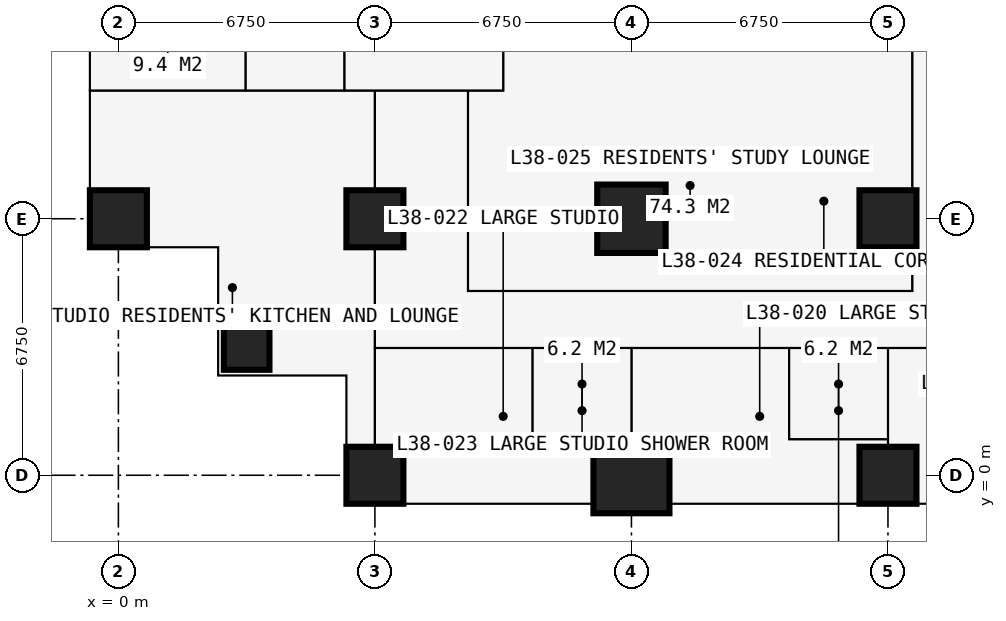
"""IFC4 building model, lengths in metres.
Left out: names, types, materials, properties, quantities, classifications, styles, units other than length and angle.
Written with IfcOpenShell. Run it as: python <this file> out.ifc"""

import sys

from ifc_helpers import new_model, si_unit, direction, frame, frame_2d, origin, origin_2d, place, context, subcontext, project, spatial, rectangle, extrude, element, fill, save


model = new_model("IFC4")
c1 = context("Model", 3, precision=1e-05, world=origin(), true_north=direction((0.0, 1.0)))
c2 = subcontext(c1, "Body", "Model", "MODEL_VIEW")
j1 = project(units=[si_unit("LENGTHUNIT", "METRE"), si_unit("PLANEANGLEUNIT", "RADIAN")], contexts=[c1])
p1 = place(None, origin())
s1 = spatial("IfcSite", under=j1, at=p1, CompositionType="ELEMENT")
p2 = place(p1, origin())
s2 = spatial("IfcBuilding", under=s1, at=p2, CompositionType="ELEMENT")
p3 = place(p2, frame((0.0, 0.0, 142.2)))
s3 = spatial("IfcBuildingStorey", under=s2, at=p3, CompositionType="ELEMENT", Elevation=142.2)
p4 = place(p3, frame((0.0, 6.75, 0.0), z_axis=(0.0, 0.0, 1.0), x_axis=(1.0, 0.0, 0.0)))
e1 = element("IfcColumn", 1, at=p4, inside=s3, PredefinedType="COLUMN", context=c2, shape_type="SweptSolid", body=[
    extrude(rectangle(XDim=1.5, YDim=1.5, at=origin_2d()), origin(), (0.0, 0.0, 1.0), 3.6),
])
p5 = place(p3, frame((3.375, 3.375, 0.0), z_axis=(0.0, 0.0, 1.0), x_axis=(1.0, 0.0, 0.0)))
e2 = element("IfcColumn", 2, at=p5, inside=s3, PredefinedType="COLUMN", context=c2, shape_type="SweptSolid", body=[
    extrude(rectangle(XDim=1.2, YDim=1.2, at=origin_2d()), origin(), (0.0, 0.0, 1.0), 3.6),
])
for number, where, z_axis, x_axis in (
    (3, (6.75, 0.0, 0.0), (0.0, 0.0, 1.0), (1.0, 0.0, 0.0)),
    (4, (6.75, 6.75, 0.0), (0.0, 0.0, 1.0), (1.0, 0.0, 0.0)),
):
    element("IfcColumn", number, at=place(p3, frame(where, z_axis=z_axis, x_axis=x_axis)), inside=s3, PredefinedType="COLUMN", context=c2, shape_type="SweptSolid", body=[
        extrude(rectangle(XDim=1.5, YDim=1.5, at=origin_2d()), origin(), (0.0, 0.0, 1.0), 3.6),
    ])
p6 = place(p3, frame((13.5, 0.0, 0.0), z_axis=(0.0, 0.0, 1.0), x_axis=(1.0, 0.0, 0.0)))
e5 = element("IfcColumn", 5, at=p6, inside=s3, PredefinedType="COLUMN", context=c2, shape_type="SweptSolid", body=[
    extrude(rectangle(XDim=2.0, YDim=2.0, at=origin_2d()), origin(), (0.0, 0.0, 1.0), 3.6),
])
p7 = place(p3, frame((13.5, 6.75, 0.0), z_axis=(0.0, 0.0, 1.0), x_axis=(1.0, 0.0, 0.0)))
e6 = element("IfcColumn", 6, at=p7, inside=s3, PredefinedType="COLUMN", context=c2, shape_type="SweptSolid", body=[
    extrude(rectangle(XDim=1.8, YDim=1.8, at=origin_2d()), origin(), (0.0, 0.0, 1.0), 3.6),
])
for number, where, z_axis, x_axis in (
    (7, (20.25, 0.0, 0.0), (0.0, 0.0, 1.0), (1.0, 0.0, 0.0)),
    (8, (20.25, 6.75, 0.0), (0.0, 0.0, 1.0), (1.0, 0.0, 0.0)),
):
    element("IfcColumn", number, at=place(p3, frame(where, z_axis=z_axis, x_axis=x_axis)), inside=s3, PredefinedType="COLUMN", context=c2, shape_type="SweptSolid", body=[
        extrude(rectangle(XDim=1.5, YDim=1.5, at=origin_2d()), origin(), (0.0, 0.0, 1.0), 3.6),
    ])
p8 = place(p3, frame((-0.75, 6.0, 0.0), z_axis=(0.0, 0.0, 1.0), x_axis=(1.0, 0.0, 0.0)))
e9 = element("IfcWall", 9, at=p8, inside=s3, PredefinedType="SOLIDWALL", context=c2, shape_type="SweptSolid", body=[
    extrude(rectangle(XDim=3.375, YDim=0.3, at=frame_2d((1.688, 0.0))), origin(), (0.0, 0.0, 1.0), 3.375),
])
p9 = place(p8, frame((1.607, 0.0, 0.9)))
e10 = element("IfcOpeningElement", 10, at=p9, cuts=e9, PredefinedType="OPENING", context=c2, shape_type="SweptSolid", body=[
    extrude(rectangle(XDim=1.5, YDim=1.8, at=frame_2d((0.75, 0.9))), frame((0.0, 0.16, 0.0), z_axis=(0.0, -1.0, 0.0), x_axis=(1.0, 0.0, 0.0)), (0.0, 0.0, 1.0), 0.32),
])
p10 = place(p3, frame((2.625, 6.0, 0.0), z_axis=(0.0, 0.0, 1.0), x_axis=(0.0, -1.0, 0.0)))
e11 = element("IfcWall", 11, at=p10, inside=s3, PredefinedType="SOLIDWALL", context=c2, shape_type="SweptSolid", body=[
    extrude(rectangle(XDim=3.375, YDim=0.3, at=frame_2d((1.688, 0.0))), origin(), (0.0, 0.0, 1.0), 3.375),
])
p11 = place(p10, frame((0.788, 0.0, 0.6)))
e12 = element("IfcOpeningElement", 12, at=p11, cuts=e11, PredefinedType="OPENING", context=c2, shape_type="SweptSolid", body=[
    extrude(rectangle(XDim=1.8, YDim=2.1, at=frame_2d((0.9, 1.05))), frame((0.0, 0.16, 0.0), z_axis=(0.0, -1.0, 0.0), x_axis=(1.0, 0.0, 0.0)), (0.0, 0.0, 1.0), 0.32),
])
p12 = place(p3, frame((2.625, 2.625, 0.0), z_axis=(0.0, 0.0, 1.0), x_axis=(1.0, 0.0, 0.0)))
e13 = element("IfcWall", 13, at=p12, inside=s3, PredefinedType="SOLIDWALL", context=c2, shape_type="SweptSolid", body=[
    extrude(rectangle(XDim=3.375, YDim=0.3, at=frame_2d((1.688, 0.0))), origin(), (0.0, 0.0, 1.0), 3.375),
])
p13 = place(p12, frame((0.788, 0.0, 0.6)))
e14 = element("IfcOpeningElement", 14, at=p13, cuts=e13, PredefinedType="OPENING", context=c2, shape_type="SweptSolid", body=[
    extrude(rectangle(XDim=1.8, YDim=2.1, at=frame_2d((0.9, 1.05))), frame((0.0, 0.16, 0.0), z_axis=(0.0, -1.0, 0.0), x_axis=(1.0, 0.0, 0.0)), (0.0, 0.0, 1.0), 0.32),
])
p14 = place(p3, frame((6.0, 2.625, 0.0), z_axis=(0.0, 0.0, 1.0), x_axis=(0.0, -1.0, 0.0)))
e15 = element("IfcWall", 15, at=p14, inside=s3, PredefinedType="SOLIDWALL", context=c2, shape_type="SweptSolid", body=[
    extrude(rectangle(XDim=3.375, YDim=0.3, at=frame_2d((1.688, 0.0))), origin(), (0.0, 0.0, 1.0), 3.375),
])
p15 = place(p14, frame((0.268, 0.0, 0.9)))
e16 = element("IfcOpeningElement", 16, at=p15, cuts=e15, PredefinedType="OPENING", context=c2, shape_type="SweptSolid", body=[
    extrude(rectangle(XDim=1.5, YDim=1.8, at=frame_2d((0.75, 0.9))), frame((0.0, 0.16, 0.0), z_axis=(0.0, -1.0, 0.0), x_axis=(1.0, 0.0, 0.0)), (0.0, 0.0, 1.0), 0.32),
])
p16 = place(p3, frame((20.25, -0.75, 0.0), z_axis=(0.0, 0.0, 1.0), x_axis=(-1.0, 0.0, 0.0)))
e17 = element("IfcWall", 17, at=p16, inside=s3, PredefinedType="SOLIDWALL", context=c2, shape_type="SweptSolid", body=[
    extrude(rectangle(XDim=6.75, YDim=0.15, at=frame_2d((3.375, 0.0))), origin(), (0.0, 0.0, 1.0), 3.375),
])
p17 = place(p16, frame((0.863, 0.0, 0.0)))
e18 = element("IfcOpeningElement", 18, at=p17, cuts=e17, PredefinedType="OPENING", context=c2, shape_type="SweptSolid", body=[
    extrude(rectangle(XDim=1.0, YDim=2.2, at=frame_2d((0.5, 1.1))), frame((0.0, 0.085, 0.0), z_axis=(0.0, -1.0, 0.0), x_axis=(1.0, 0.0, 0.0)), (0.0, 0.0, 1.0), 0.17),
])
p18 = place(p16, frame((1.975, 0.0, 0.9)))
e19 = element("IfcOpeningElement", 19, at=p18, cuts=e17, PredefinedType="OPENING", context=c2, shape_type="SweptSolid", body=[
    extrude(rectangle(XDim=1.2, YDim=1.8, at=frame_2d((0.6, 0.9))), frame((0.0, 0.085, 0.0), z_axis=(0.0, -1.0, 0.0), x_axis=(1.0, 0.0, 0.0)), (0.0, 0.0, 1.0), 0.17),
])
p19 = place(p16, frame((4.621, 0.0, 0.0)))
e20 = element("IfcOpeningElement", 20, at=p19, cuts=e17, PredefinedType="OPENING", context=c2, shape_type="SweptSolid", body=[
    extrude(rectangle(XDim=1.0, YDim=2.2, at=frame_2d((0.5, 1.1))), frame((0.0, 0.085, 0.0), z_axis=(0.0, -1.0, 0.0), x_axis=(1.0, 0.0, 0.0)), (0.0, 0.0, 1.0), 0.17),
])
p20 = place(p16, frame((3.592, 0.0, 0.9)))
e21 = element("IfcOpeningElement", 21, at=p20, cuts=e17, PredefinedType="OPENING", context=c2, shape_type="SweptSolid", body=[
    extrude(rectangle(XDim=0.9, YDim=1.8, at=frame_2d((0.45, 0.9))), frame((0.0, 0.085, 0.0), z_axis=(0.0, -1.0, 0.0), x_axis=(1.0, 0.0, 0.0)), (0.0, 0.0, 1.0), 0.17),
])
p21 = place(p3, frame((16.875, -0.85, 0.0), z_axis=(0.0, 0.0, 1.0), x_axis=(0.0, -1.0, 0.0)))
e22 = element("IfcWall", 22, at=p21, inside=s3, PredefinedType="USERDEFINED", context=c2, shape_type="SweptSolid", body=[
    extrude(rectangle(XDim=2.2, YDim=1.0, at=frame_2d((1.1, 0.0))), origin(), (0.0, 0.0, 1.0), 0.9),
])
p22 = place(p3, frame((-0.734, 10.125, 0.0), z_axis=(0.0, 0.0, 1.0), x_axis=(1.0, 0.0, 0.0)))
e23 = element("IfcWall", 23, at=p22, inside=s3, PredefinedType="PARTITIONING", context=c2, shape_type="SweptSolid", body=[
    extrude(rectangle(XDim=10.859, YDim=0.15, at=frame_2d((5.429, 0.0))), origin(), (0.0, 0.0, 1.0), 3.375),
])
p23 = place(p22, frame((8.234, 0.0, 0.0)))
e24 = element("IfcOpeningElement", 24, at=p23, cuts=e23, PredefinedType="OPENING", context=c2, shape_type="SweptSolid", body=[
    extrude(rectangle(XDim=0.95, YDim=2.2, at=frame_2d((0.475, 1.1))), frame((0.0, 0.085, 0.0), z_axis=(0.0, -1.0, 0.0), x_axis=(1.0, 0.0, 0.0)), (0.0, 0.0, 1.0), 0.17),
])
p24 = place(p3, frame((3.35, 10.125, 0.0), z_axis=(0.0, 0.0, 1.0), x_axis=(0.0, 1.0, 0.0)))
e25 = element("IfcWall", 25, at=p24, inside=s3, PredefinedType="PARTITIONING", context=c2, shape_type="SweptSolid", body=[
    extrude(rectangle(XDim=16.875, YDim=0.15, at=frame_2d((8.438, 0.0))), origin(), (0.0, 0.0, 1.0), 3.375),
])
p25 = place(p24, frame((7.575, 0.0, 0.0)))
e26 = element("IfcOpeningElement", 26, at=p25, cuts=e25, PredefinedType="OPENING", context=c2, shape_type="SweptSolid", body=[
    extrude(rectangle(XDim=0.95, YDim=2.2, at=frame_2d((0.475, 1.1))), frame((0.0, 0.085, 0.0), z_axis=(0.0, -1.0, 0.0), x_axis=(1.0, 0.0, 0.0)), (0.0, 0.0, 1.0), 0.17),
])
p26 = place(p24, frame((14.325, 0.0, 0.0)))
e27 = element("IfcOpeningElement", 27, at=p26, cuts=e25, PredefinedType="OPENING", context=c2, shape_type="SweptSolid", body=[
    extrude(rectangle(XDim=0.95, YDim=2.2, at=frame_2d((0.475, 1.1))), frame((0.0, 0.085, 0.0), z_axis=(0.0, -1.0, 0.0), x_axis=(1.0, 0.0, 0.0)), (0.0, 0.0, 1.0), 0.17),
])
p27 = place(p24, frame((0.2, 0.0, 0.0)))
e28 = element("IfcOpeningElement", 28, at=p27, cuts=e25, PredefinedType="OPENING", context=c2, shape_type="SweptSolid", body=[
    extrude(rectangle(XDim=0.95, YDim=2.2, at=frame_2d((0.475, 1.1))), frame((0.0, 0.085, 0.0), z_axis=(0.0, -1.0, 0.0), x_axis=(1.0, 0.0, 0.0)), (0.0, 0.0, 1.0), 0.17),
])
p28 = place(p3, frame((5.95, 10.125, 0.0), z_axis=(0.0, 0.0, 1.0), x_axis=(0.0, 1.0, 0.0)))
e29 = element("IfcWall", 29, at=p28, inside=s3, PredefinedType="PARTITIONING", context=c2, shape_type="SweptSolid", body=[
    extrude(rectangle(XDim=2.65, YDim=0.15, at=frame_2d((1.325, 0.0))), origin(), (0.0, 0.0, 1.0), 3.375),
])
p29 = place(p3, frame((6.75, -0.734, 0.0), z_axis=(0.0, 0.0, 1.0), x_axis=(0.0, 1.0, 0.0)))
e30 = element("IfcWall", 30, at=p29, inside=s3, PredefinedType="PARTITIONING", context=c2, shape_type="SweptSolid", body=[
    extrude(rectangle(XDim=10.859, YDim=0.15, at=frame_2d((5.429, 0.0))), origin(), (0.0, 0.0, 1.0), 2.877),
])
p30 = place(p29, frame((5.684, 0.0, 0.0)))
e31 = element("IfcOpeningElement", 31, at=p30, cuts=e30, PredefinedType="OPENING", context=c2, shape_type="SweptSolid", body=[
    extrude(rectangle(XDim=1.0, YDim=2.2, at=frame_2d((0.5, 1.1))), frame((0.0, 0.085, 0.0), z_axis=(0.0, -1.0, 0.0), x_axis=(1.0, 0.0, 0.0)), (0.0, 0.0, 1.0), 0.17),
])
p31 = place(p3, frame((6.75, 3.35, 0.0), z_axis=(0.0, 0.0, 1.0), x_axis=(1.0, 0.0, 0.0)))
e32 = element("IfcWall", 32, at=p31, inside=s3, PredefinedType="PARTITIONING", context=c2, shape_type="SweptSolid", body=[
    extrude(rectangle(XDim=20.25, YDim=0.15, at=frame_2d((10.125, 0.0))), origin(), (0.0, 0.0, 1.0), 3.375),
])
p32 = place(p31, frame((15.1, 0.0, 0.0)))
e33 = element("IfcOpeningElement", 33, at=p32, cuts=e32, PredefinedType="OPENING", context=c2, shape_type="SweptSolid", body=[
    extrude(rectangle(XDim=0.95, YDim=2.2, at=frame_2d((0.475, 1.1))), frame((0.0, 0.085, 0.0), z_axis=(0.0, -1.0, 0.0), x_axis=(1.0, 0.0, 0.0)), (0.0, 0.0, 1.0), 0.17),
])
p33 = place(p31, frame((8.35, 0.0, 0.0)))
e34 = element("IfcOpeningElement", 34, at=p33, cuts=e32, PredefinedType="OPENING", context=c2, shape_type="SweptSolid", body=[
    extrude(rectangle(XDim=0.95, YDim=2.2, at=frame_2d((0.475, 1.1))), frame((0.0, 0.085, 0.0), z_axis=(0.0, -1.0, 0.0), x_axis=(1.0, 0.0, 0.0)), (0.0, 0.0, 1.0), 0.17),
])
p34 = place(p31, frame((1.6, 0.0, 0.0)))
e35 = element("IfcOpeningElement", 35, at=p34, cuts=e32, PredefinedType="OPENING", context=c2, shape_type="SweptSolid", body=[
    extrude(rectangle(XDim=0.95, YDim=2.2, at=frame_2d((0.475, 1.1))), frame((0.0, 0.085, 0.0), z_axis=(0.0, -1.0, 0.0), x_axis=(1.0, 0.0, 0.0)), (0.0, 0.0, 1.0), 0.17),
])
p35 = place(p3, frame((9.2, 4.85, 0.0), z_axis=(0.0, 0.0, 1.0), x_axis=(0.0, 1.0, 0.0)))
e36 = element("IfcWall", 36, at=p35, inside=s3, PredefinedType="PARTITIONING", context=c2, shape_type="SweptSolid", body=[
    extrude(rectangle(XDim=5.275, YDim=0.15, at=frame_2d((2.637, 0.0))), origin(), (0.0, 0.0, 1.0), 3.375),
])
p36 = place(p3, frame((9.2, 4.85, 0.0), z_axis=(0.0, 0.0, 1.0), x_axis=(1.0, 0.0, 0.0)))
e37 = element("IfcWall", 37, at=p36, inside=s3, PredefinedType="PARTITIONING", context=c2, shape_type="SweptSolid", body=[
    extrude(rectangle(XDim=11.688, YDim=0.15, at=frame_2d((5.844, 0.0))), origin(), (0.0, 0.0, 1.0), 3.375),
])
p37 = place(p36, frame((5.35, 0.0, 0.0)))
e38 = element("IfcOpeningElement", 38, at=p37, cuts=e37, PredefinedType="OPENING", context=c2, shape_type="SweptSolid", body=[
    extrude(rectangle(XDim=0.95, YDim=2.2, at=frame_2d((0.475, 1.1))), frame((0.0, 0.085, 0.0), z_axis=(0.0, -1.0, 0.0), x_axis=(1.0, 0.0, 0.0)), (0.0, 0.0, 1.0), 0.17),
])
p38 = place(p3, frame((10.125, 10.125, 0.0), z_axis=(0.0, 0.0, 1.0), x_axis=(0.0, 1.0, 0.0)))
e39 = element("IfcWall", 39, at=p38, inside=s3, PredefinedType="PARTITIONING", context=c2, shape_type="SweptSolid", body=[
    extrude(rectangle(XDim=1.175, YDim=0.15, at=frame_2d((0.587, 0.0))), origin(), (0.0, 0.0, 1.0), 3.375),
])
p39 = place(p3, frame((10.9, 0.95, 0.0), z_axis=(0.0, 0.0, 1.0), x_axis=(0.0, 1.0, 0.0)))
e40 = element("IfcWall", 40, at=p39, inside=s3, PredefinedType="PARTITIONING", context=c2, shape_type="SweptSolid", body=[
    extrude(rectangle(XDim=2.4, YDim=0.1, at=frame_2d((1.2, 0.0))), origin(), (0.0, 0.0, 1.0), 3.375),
])
p40 = place(p3, frame((10.9, 0.95, 0.0), z_axis=(0.0, 0.0, 1.0), x_axis=(1.0, 0.0, 0.0)))
e41 = element("IfcWall", 41, at=p40, inside=s3, PredefinedType="PARTITIONING", context=c2, shape_type="SweptSolid", body=[
    extrude(rectangle(XDim=2.6, YDim=0.1, at=frame_2d((1.3, 0.0))), origin(), (0.0, 0.0, 1.0), 3.375),
])
p41 = place(p3, frame((13.5, -0.734, 0.0), z_axis=(0.0, 0.0, 1.0), x_axis=(0.0, 1.0, 0.0)))
e42 = element("IfcWall", 42, at=p41, inside=s3, PredefinedType="PARTITIONING", context=c2, shape_type="SweptSolid", body=[
    extrude(rectangle(XDim=4.084, YDim=0.1, at=frame_2d((2.042, 0.0))), origin(), (0.0, 0.0, 1.0), 2.877),
])
p42 = place(p41, frame((2.434, 0.0, 0.0)))
e43 = element("IfcOpeningElement", 43, at=p42, cuts=e42, PredefinedType="OPENING", context=c2, shape_type="SweptSolid", body=[
    extrude(rectangle(XDim=0.9, YDim=2.2, at=frame_2d((0.45, 1.1))), frame((0.0, 0.06, 0.0), z_axis=(0.0, -1.0, 0.0), x_axis=(1.0, 0.0, 0.0)), (0.0, 0.0, 1.0), 0.12),
])
p43 = place(p3, frame((17.65, 0.95, 0.0), z_axis=(0.0, 0.0, 1.0), x_axis=(0.0, 1.0, 0.0)))
e44 = element("IfcWall", 44, at=p43, inside=s3, PredefinedType="PARTITIONING", context=c2, shape_type="SweptSolid", body=[
    extrude(rectangle(XDim=2.4, YDim=0.1, at=frame_2d((1.2, 0.0))), origin(), (0.0, 0.0, 1.0), 3.375),
])
p44 = place(p3, frame((17.65, 0.95, 0.0), z_axis=(0.0, 0.0, 1.0), x_axis=(1.0, 0.0, 0.0)))
e45 = element("IfcWall", 45, at=p44, inside=s3, PredefinedType="PARTITIONING", context=c2, shape_type="SweptSolid", body=[
    extrude(rectangle(XDim=2.6, YDim=0.1, at=frame_2d((1.3, 0.0))), origin(), (0.0, 0.0, 1.0), 3.375),
])
p45 = place(p3, frame((20.25, -0.734, 0.0), z_axis=(0.0, 0.0, 1.0), x_axis=(0.0, 1.0, 0.0)))
e46 = element("IfcWall", 46, at=p45, inside=s3, PredefinedType="PARTITIONING", context=c2, shape_type="SweptSolid", body=[
    extrude(rectangle(XDim=4.084, YDim=0.1, at=frame_2d((2.042, 0.0))), origin(), (0.0, 0.0, 1.0), 2.877),
])
p46 = place(p45, frame((2.434, 0.0, 0.0)))
e47 = element("IfcOpeningElement", 47, at=p46, cuts=e46, PredefinedType="OPENING", context=c2, shape_type="SweptSolid", body=[
    extrude(rectangle(XDim=0.9, YDim=2.2, at=frame_2d((0.45, 1.1))), frame((0.0, 0.06, 0.0), z_axis=(0.0, -1.0, 0.0), x_axis=(1.0, 0.0, 0.0)), (0.0, 0.0, 1.0), 0.12),
])
p47 = place(p3, frame((20.887, 4.85, 0.0), z_axis=(0.0, 0.0, 1.0), x_axis=(0.0, 1.0, 0.0)))
e48 = element("IfcWall", 48, at=p47, inside=s3, PredefinedType="PARTITIONING", context=c2, shape_type="SweptSolid", body=[
    extrude(rectangle(XDim=6.45, YDim=0.15, at=frame_2d((3.225, 0.0))), origin(), (0.0, 0.0, 1.0), 3.375),
])
p48 = place(p9, origin())
e49 = element("IfcWindow", 49, at=p48, inside=s3, PartitioningType="SINGLE_PANEL", PredefinedType="WINDOW", context=c2, shape_type="SweptSolid", body=[
    extrude(rectangle(XDim=1.5, YDim=1.8, at=frame_2d((0.75, 0.9))), frame((0.0, 0.03, 0.0), z_axis=(0.0, -1.0, 0.0), x_axis=(1.0, 0.0, 0.0)), (0.0, 0.0, 1.0), 0.06),
])
fill(e10, e49)
p49 = place(p11, origin())
e50 = element("IfcWindow", 50, at=p49, inside=s3, PartitioningType="SINGLE_PANEL", PredefinedType="WINDOW", context=c2, shape_type="SweptSolid", body=[
    extrude(rectangle(XDim=1.8, YDim=2.1, at=frame_2d((0.9, 1.05))), frame((0.0, 0.03, 0.0), z_axis=(0.0, -1.0, 0.0), x_axis=(1.0, 0.0, 0.0)), (0.0, 0.0, 1.0), 0.06),
])
fill(e12, e50)
p50 = place(p13, origin())
e51 = element("IfcWindow", 51, at=p50, inside=s3, PartitioningType="SINGLE_PANEL", PredefinedType="WINDOW", context=c2, shape_type="SweptSolid", body=[
    extrude(rectangle(XDim=1.8, YDim=2.1, at=frame_2d((0.9, 1.05))), frame((0.0, 0.03, 0.0), z_axis=(0.0, -1.0, 0.0), x_axis=(1.0, 0.0, 0.0)), (0.0, 0.0, 1.0), 0.06),
])
fill(e14, e51)
p51 = place(p15, origin())
e52 = element("IfcWindow", 52, at=p51, inside=s3, PartitioningType="SINGLE_PANEL", PredefinedType="WINDOW", context=c2, shape_type="SweptSolid", body=[
    extrude(rectangle(XDim=1.5, YDim=1.8, at=frame_2d((0.75, 0.9))), frame((0.0, 0.03, 0.0), z_axis=(0.0, -1.0, 0.0), x_axis=(1.0, 0.0, 0.0)), (0.0, 0.0, 1.0), 0.06),
])
fill(e16, e52)
p52 = place(p17, origin())
e53 = element("IfcDoor", 53, at=p52, inside=s3, OperationType="SINGLE_SWING_LEFT", PredefinedType="DOOR", context=c2, shape_type="SweptSolid", body=[
    extrude(rectangle(XDim=1.0, YDim=2.2, at=frame_2d((0.5, 1.1))), frame((0.0, 0.025, 0.0), z_axis=(0.0, -1.0, 0.0), x_axis=(1.0, 0.0, 0.0)), (0.0, 0.0, 1.0), 0.05),
])
fill(e18, e53)
p53 = place(p18, origin())
e54 = element("IfcWindow", 54, at=p53, inside=s3, PartitioningType="SINGLE_PANEL", PredefinedType="WINDOW", context=c2, shape_type="SweptSolid", body=[
    extrude(rectangle(XDim=1.2, YDim=1.8, at=frame_2d((0.6, 0.9))), frame((0.0, 0.03, 0.0), z_axis=(0.0, -1.0, 0.0), x_axis=(1.0, 0.0, 0.0)), (0.0, 0.0, 1.0), 0.06),
])
fill(e19, e54)
p54 = place(p19, origin())
e55 = element("IfcDoor", 55, at=p54, inside=s3, OperationType="SINGLE_SWING_RIGHT", PredefinedType="DOOR", context=c2, shape_type="SweptSolid", body=[
    extrude(rectangle(XDim=1.0, YDim=2.2, at=frame_2d((0.5, 1.1))), frame((0.0, 0.025, 0.0), z_axis=(0.0, -1.0, 0.0), x_axis=(1.0, 0.0, 0.0)), (0.0, 0.0, 1.0), 0.05),
])
fill(e20, e55)
p55 = place(p20, origin())
e56 = element("IfcWindow", 56, at=p55, inside=s3, PartitioningType="SINGLE_PANEL", PredefinedType="WINDOW", context=c2, shape_type="SweptSolid", body=[
    extrude(rectangle(XDim=0.9, YDim=1.8, at=frame_2d((0.45, 0.9))), frame((0.0, 0.03, 0.0), z_axis=(0.0, -1.0, 0.0), x_axis=(1.0, 0.0, 0.0)), (0.0, 0.0, 1.0), 0.06),
])
fill(e21, e56)
p56 = place(p30, origin())
e57 = element("IfcDoor", 57, at=p56, inside=s3, OperationType="SINGLE_SWING_LEFT", PredefinedType="DOOR", context=c2, shape_type="SweptSolid", body=[
    extrude(rectangle(XDim=1.0, YDim=2.2, at=frame_2d((0.5, 1.1))), frame((0.0, 0.025, 0.0), z_axis=(0.0, -1.0, 0.0), x_axis=(1.0, 0.0, 0.0)), (0.0, 0.0, 1.0), 0.05),
])
fill(e31, e57)
p57 = place(p33, origin())
e58 = element("IfcDoor", 58, at=p57, inside=s3, OperationType="SINGLE_SWING_LEFT", PredefinedType="DOOR", context=c2, shape_type="SweptSolid", body=[
    extrude(rectangle(XDim=0.95, YDim=2.2, at=frame_2d((0.475, 1.1))), frame((0.0, 0.025, 0.0), z_axis=(0.0, -1.0, 0.0), x_axis=(1.0, 0.0, 0.0)), (0.0, 0.0, 1.0), 0.05),
])
fill(e34, e58)
p58 = place(p46, origin())
e59 = element("IfcDoor", 59, at=p58, inside=s3, OperationType="SINGLE_SWING_RIGHT", PredefinedType="DOOR", context=c2, shape_type="SweptSolid", body=[
    extrude(rectangle(XDim=0.9, YDim=2.2, at=frame_2d((0.45, 1.1))), frame((0.0, 0.025, 0.0), z_axis=(0.0, -1.0, 0.0), x_axis=(1.0, 0.0, 0.0)), (0.0, 0.0, 1.0), 0.05),
])
fill(e47, e59)
p59 = place(p34, origin())
e60 = element("IfcDoor", 60, at=p59, inside=s3, OperationType="SINGLE_SWING_LEFT", PredefinedType="DOOR", context=c2, shape_type="SweptSolid", body=[
    extrude(rectangle(XDim=0.95, YDim=2.2, at=frame_2d((0.475, 1.1))), frame((0.0, 0.025, 0.0), z_axis=(0.0, -1.0, 0.0), x_axis=(1.0, 0.0, 0.0)), (0.0, 0.0, 1.0), 0.05),
])
fill(e35, e60)
p60 = place(p42, origin())
e61 = element("IfcDoor", 61, at=p60, inside=s3, OperationType="SINGLE_SWING_RIGHT", PredefinedType="DOOR", context=c2, shape_type="SweptSolid", body=[
    extrude(rectangle(XDim=0.9, YDim=2.2, at=frame_2d((0.45, 1.1))), frame((0.0, 0.025, 0.0), z_axis=(0.0, -1.0, 0.0), x_axis=(1.0, 0.0, 0.0)), (0.0, 0.0, 1.0), 0.05),
])
fill(e43, e61)
p61 = place(p37, origin())
e62 = element("IfcDoor", 62, at=p61, inside=s3, OperationType="SINGLE_SWING_LEFT", PredefinedType="DOOR", context=c2, shape_type="SweptSolid", body=[
    extrude(rectangle(XDim=0.95, YDim=2.2, at=frame_2d((0.475, 1.1))), frame((0.0, 0.025, 0.0), z_axis=(0.0, -1.0, 0.0), x_axis=(1.0, 0.0, 0.0)), (0.0, 0.0, 1.0), 0.05),
])
fill(e38, e62)
p62 = place(p27, origin())
e63 = element("IfcDoor", 63, at=p62, inside=s3, OperationType="SINGLE_SWING_LEFT", PredefinedType="DOOR", context=c2, shape_type="SweptSolid", body=[
    extrude(rectangle(XDim=0.95, YDim=2.2, at=frame_2d((0.475, 1.1))), frame((0.0, 0.025, 0.0), z_axis=(0.0, -1.0, 0.0), x_axis=(1.0, 0.0, 0.0)), (0.0, 0.0, 1.0), 0.05),
])
fill(e28, e63)
p63 = place(p23, origin())
e64 = element("IfcDoor", 64, at=p63, inside=s3, OperationType="SINGLE_SWING_LEFT", PredefinedType="DOOR", context=c2, shape_type="SweptSolid", body=[
    extrude(rectangle(XDim=0.95, YDim=2.2, at=frame_2d((0.475, 1.1))), frame((0.0, 0.025, 0.0), z_axis=(0.0, -1.0, 0.0), x_axis=(1.0, 0.0, 0.0)), (0.0, 0.0, 1.0), 0.05),
])
fill(e24, e64)
save(model, sys.argv[1])
